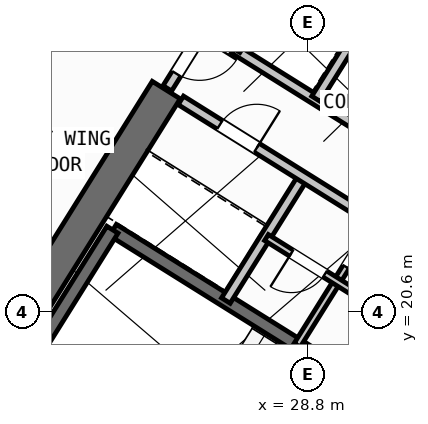
"""IFC4 building model, lengths in metres.
Left out: names, types, materials, properties, quantities, classifications, styles, units other than length and angle.
Written with IfcOpenShell. Run it as: python <this file> out.ifc"""

import sys

from ifc_helpers import new_model, si_unit, direction, frame, frame_2d, origin, place, context, subcontext, project, spatial, rectangle, extrude, source, transform, mapped, element, fill, save


model = new_model("IFC4")
c1 = context("Model", 3, precision=1e-05, world=origin(), true_north=direction((0.0, 1.0)))
c2 = subcontext(c1, "Body", "Model", "MODEL_VIEW")
j1 = project(units=[si_unit("LENGTHUNIT", "METRE"), si_unit("PLANEANGLEUNIT", "RADIAN")], contexts=[c1])
p1 = place(None, origin())
s1 = spatial("IfcSite", under=j1, at=p1, CompositionType="ELEMENT")
p2 = place(p1, origin())
s2 = spatial("IfcBuilding", under=s1, at=p2, CompositionType="ELEMENT")
p3 = place(p2, frame((0.0, 0.0, 45.6)))
s3 = spatial("IfcBuildingStorey", under=s2, at=p3, CompositionType="ELEMENT", Elevation=45.6)
p4 = place(p3, frame((40.615, 23.983, 0.0), z_axis=(0.0, 0.0, 1.0), x_axis=(-0.848045953968, 0.529922692436, 0.0)))
e1 = element("IfcWall", 1, at=p4, inside=s3, PredefinedType="SHEAR", context=c2, shape_type="SweptSolid", body=[
    extrude(rectangle(XDim=13.24, YDim=0.65, at=frame_2d((6.62, 0.0))), origin(), (0.0, 0.0, 1.0), 3.35),
])
p5 = place(p3, frame((26.007, 24.976, 0.0), z_axis=(0.0, 0.0, 1.0), x_axis=(-0.529916319127, -0.848049936456, 0.0)))
e2 = element("IfcWall", 2, at=p5, inside=s3, PredefinedType="SHEAR", context=c2, shape_type="SweptSolid", body=[
    extrude(rectangle(XDim=6.375, YDim=0.65, at=frame_2d((3.188, 0.0))), origin(), (0.0, 0.0, 1.0), 3.35),
])
p6 = place(p3, frame((29.268, 6.429, 0.0), z_axis=(0.0, 0.0, 1.0), x_axis=(-0.848049971435, 0.529916263149, 0.0)))
e3 = element("IfcWall", 3, at=p6, inside=s3, PredefinedType="STANDARD", context=c2, shape_type="SweptSolid", body=[
    extrude(rectangle(XDim=31.588, YDim=0.32, at=frame_2d((15.794, 0.0))), origin(), (0.0, 0.0, 1.0), 3.35),
])
p7 = place(p6, frame((16.362, 0.0, 0.0)))
e4 = element("IfcOpeningElement", 4, at=p7, cuts=e3, PredefinedType="OPENING", context=c2, shape_type="SweptSolid", body=[
    extrude(rectangle(XDim=1.2, YDim=2.15, at=frame_2d((0.6, 1.075))), frame((0.0, 0.17, 0.0), z_axis=(0.0, -1.0, 0.0), x_axis=(1.0, 0.0, 0.0)), (0.0, 0.0, 1.0), 0.34),
])
p8 = place(p6, frame((2.989, 0.0, 0.8)))
e5 = element("IfcOpeningElement", 5, at=p8, cuts=e3, PredefinedType="OPENING", context=c2, shape_type="SweptSolid", body=[
    extrude(rectangle(XDim=2.1, YDim=1.55, at=frame_2d((1.05, 0.775))), frame((0.0, 0.17, 0.0), z_axis=(0.0, -1.0, 0.0), x_axis=(1.0, 0.0, 0.0)), (0.0, 0.0, 1.0), 0.34),
])
p9 = place(p6, frame((8.359, 0.0, 0.8)))
e6 = element("IfcOpeningElement", 6, at=p9, cuts=e3, PredefinedType="OPENING", context=c2, shape_type="SweptSolid", body=[
    extrude(rectangle(XDim=2.1, YDim=1.55, at=frame_2d((1.05, 0.775))), frame((0.0, 0.17, 0.0), z_axis=(0.0, -1.0, 0.0), x_axis=(1.0, 0.0, 0.0)), (0.0, 0.0, 1.0), 0.34),
])
p10 = place(p6, frame((13.284, 0.0, 0.95)))
e7 = element("IfcOpeningElement", 7, at=p10, cuts=e3, PredefinedType="OPENING", context=c2, shape_type="SweptSolid", body=[
    extrude(rectangle(XDim=1.2, YDim=1.4, at=frame_2d((0.6, 0.7))), frame((0.0, 0.17, 0.0), z_axis=(0.0, -1.0, 0.0), x_axis=(1.0, 0.0, 0.0)), (0.0, 0.0, 1.0), 0.34),
])
p11 = place(p6, frame((20.259, 0.0, 0.95)))
e8 = element("IfcOpeningElement", 8, at=p11, cuts=e3, PredefinedType="OPENING", context=c2, shape_type="SweptSolid", body=[
    extrude(rectangle(XDim=1.2, YDim=1.4, at=frame_2d((0.6, 0.7))), frame((0.0, 0.17, 0.0), z_axis=(0.0, -1.0, 0.0), x_axis=(1.0, 0.0, 0.0)), (0.0, 0.0, 1.0), 0.34),
])
p12 = place(p6, frame((22.929, 0.0, 0.95)))
e9 = element("IfcOpeningElement", 9, at=p12, cuts=e3, PredefinedType="OPENING", context=c2, shape_type="SweptSolid", body=[
    extrude(rectangle(XDim=1.2, YDim=1.4, at=frame_2d((0.6, 0.7))), frame((0.0, 0.17, 0.0), z_axis=(0.0, -1.0, 0.0), x_axis=(1.0, 0.0, 0.0)), (0.0, 0.0, 1.0), 0.34),
])
p13 = place(p6, frame((26.106, 0.0, 0.85)))
e10 = element("IfcOpeningElement", 10, at=p13, cuts=e3, PredefinedType="OPENING", context=c2, shape_type="SweptSolid", body=[
    extrude(rectangle(XDim=1.5, YDim=1.5, at=frame_2d((0.75, 0.75))), frame((0.0, 0.17, 0.0), z_axis=(0.0, -1.0, 0.0), x_axis=(1.0, 0.0, 0.0)), (0.0, 0.0, 1.0), 0.34),
])
p14 = place(p6, frame((29.068, 0.0, 0.85)))
e11 = element("IfcOpeningElement", 11, at=p14, cuts=e3, PredefinedType="OPENING", context=c2, shape_type="SweptSolid", body=[
    extrude(rectangle(XDim=1.8, YDim=1.5, at=frame_2d((0.9, 0.75))), frame((0.0, 0.17, 0.0), z_axis=(0.0, -1.0, 0.0), x_axis=(1.0, 0.0, 0.0)), (0.0, 0.0, 1.0), 0.34),
])
p15 = place(p3, frame((14.138, 41.825, 0.0), z_axis=(0.0, 0.0, 1.0), x_axis=(0.848046498049, -0.529921821731, 0.0)))
e12 = element("IfcWall", 12, at=p15, inside=s3, PredefinedType="STANDARD", context=c2, shape_type="SweptSolid", body=[
    extrude(rectangle(XDim=31.588, YDim=0.32, at=frame_2d((15.794, 0.0))), origin(), (0.0, 0.0, 1.0), 3.35),
])
p16 = place(p15, frame((3.159, 0.0, 0.0)))
e13 = element("IfcOpeningElement", 13, at=p16, cuts=e12, PredefinedType="OPENING", context=c2, shape_type="SweptSolid", body=[
    extrude(rectangle(XDim=1.05, YDim=2.15, at=frame_2d((0.525, 1.075))), frame((0.0, 0.17, 0.0), z_axis=(0.0, -1.0, 0.0), x_axis=(1.0, 0.0, 0.0)), (0.0, 0.0, 1.0), 0.34),
])
p17 = place(p15, frame((0.906, 0.0, 1.0)))
e14 = element("IfcOpeningElement", 14, at=p17, cuts=e12, PredefinedType="OPENING", context=c2, shape_type="SweptSolid", body=[
    extrude(rectangle(XDim=0.9, YDim=1.25, at=frame_2d((0.45, 0.625))), frame((0.0, 0.17, 0.0), z_axis=(0.0, -1.0, 0.0), x_axis=(1.0, 0.0, 0.0)), (0.0, 0.0, 1.0), 0.34),
])
p18 = place(p15, frame((9.537, 0.0, 0.85)))
e15 = element("IfcOpeningElement", 15, at=p18, cuts=e12, PredefinedType="OPENING", context=c2, shape_type="SweptSolid", body=[
    extrude(rectangle(XDim=1.8, YDim=1.5, at=frame_2d((0.9, 0.75))), frame((0.0, 0.17, 0.0), z_axis=(0.0, -1.0, 0.0), x_axis=(1.0, 0.0, 0.0)), (0.0, 0.0, 1.0), 0.34),
])
p19 = place(p15, frame((13.899, 0.0, 0.85)))
e16 = element("IfcOpeningElement", 16, at=p19, cuts=e12, PredefinedType="OPENING", context=c2, shape_type="SweptSolid", body=[
    extrude(rectangle(XDim=1.5, YDim=1.5, at=frame_2d((0.75, 0.75))), frame((0.0, 0.17, 0.0), z_axis=(0.0, -1.0, 0.0), x_axis=(1.0, 0.0, 0.0)), (0.0, 0.0, 1.0), 0.34),
])
p20 = place(p15, frame((22.019, 0.0, 0.95)))
e17 = element("IfcOpeningElement", 17, at=p20, cuts=e12, PredefinedType="OPENING", context=c2, shape_type="SweptSolid", body=[
    extrude(rectangle(XDim=1.2, YDim=1.4, at=frame_2d((0.6, 0.7))), frame((0.0, 0.17, 0.0), z_axis=(0.0, -1.0, 0.0), x_axis=(1.0, 0.0, 0.0)), (0.0, 0.0, 1.0), 0.34),
])
p21 = place(p15, frame((27.569, 0.0, 0.95)))
e18 = element("IfcOpeningElement", 18, at=p21, cuts=e12, PredefinedType="OPENING", context=c2, shape_type="SweptSolid", body=[
    extrude(rectangle(XDim=1.2, YDim=1.4, at=frame_2d((0.6, 0.7))), frame((0.0, 0.17, 0.0), z_axis=(0.0, -1.0, 0.0), x_axis=(1.0, 0.0, 0.0)), (0.0, 0.0, 1.0), 0.34),
])
p22 = place(p3, frame((31.28, 18.261, 0.0), z_axis=(0.0, 0.0, 1.0), x_axis=(-0.848051618787, 0.529913626805, 0.0)))
e19 = element("IfcWall", 19, at=p22, inside=s3, PredefinedType="SHEAR", context=c2, shape_type="SweptSolid", body=[
    extrude(rectangle(XDim=7.46, YDim=0.26, at=frame_2d((3.73, 0.0))), origin(), (0.0, 0.0, 1.0), 3.35),
])
p23 = place(p22, frame((0.36, 0.0, 0.0)))
e20 = element("IfcOpeningElement", 20, at=p23, cuts=e19, PredefinedType="OPENING", context=c2, shape_type="SweptSolid", body=[
    extrude(rectangle(XDim=0.86, YDim=2.05, at=frame_2d((0.43, 1.025))), frame((0.0, 0.14, 0.0), z_axis=(0.0, -1.0, 0.0), x_axis=(1.0, 0.0, 0.0)), (0.0, 0.0, 1.0), 0.28),
])
p24 = place(p3, frame((24.945, 22.22, 0.0), z_axis=(0.0, 0.0, 1.0), x_axis=(-0.529908658664, -0.84805472316, 0.0)))
e21 = element("IfcWall", 21, at=p24, inside=s3, PredefinedType="SHEAR", context=c2, shape_type="SweptSolid", body=[
    extrude(rectangle(XDim=3.16, YDim=0.26, at=frame_2d((1.58, 0.0))), origin(), (0.0, 0.0, 1.0), 3.35),
])
p25 = place(p3, frame((31.822, 24.998, 0.0), z_axis=(0.0, 0.0, 1.0), x_axis=(-0.848058348634, 0.529902856485, 0.0)))
e22 = element("IfcWall", 22, at=p25, inside=s3, PredefinedType="STANDARD", context=c2, shape_type="SweptSolid", body=[
    extrude(rectangle(XDim=4.568, YDim=0.2, at=frame_2d((2.284, 0.0))), origin(), (0.0, 0.0, 1.0), 3.34),
])
p26 = place(p3, frame((32.108, 22.814, 0.0), z_axis=(0.0, 0.0, 1.0), x_axis=(-0.848042229521, 0.529928652696, 0.0)))
e23 = element("IfcWall", 23, at=p26, inside=s3, PredefinedType="STANDARD", context=c2, shape_type="SweptSolid", body=[
    extrude(rectangle(XDim=5.62, YDim=0.2, at=frame_2d((2.81, 0.0))), origin(), (0.0, 0.0, 1.0), 3.34),
])
p27 = place(p3, frame((28.25, 27.17, 0.0), z_axis=(0.0, 0.0, 1.0), x_axis=(-0.529905827651, -0.848056492117, 0.0)))
e24 = element("IfcWall", 24, at=p27, inside=s3, PredefinedType="STANDARD", context=c2, shape_type="SweptSolid", body=[
    extrude(rectangle(XDim=1.65, YDim=0.2, at=frame_2d((0.825, 0.0))), origin(), (0.0, 0.0, 1.0), 3.34),
])
p28 = place(p3, frame((29.801, 26.142, 0.0), z_axis=(0.0, 0.0, 1.0), x_axis=(-0.529998940003, -0.847998304005, 0.0)))
e25 = element("IfcWall", 25, at=p28, inside=s3, PredefinedType="STANDARD", context=c2, shape_type="SweptSolid", body=[
    extrude(rectangle(XDim=1.58, YDim=0.2, at=frame_2d((0.79, 0.0))), origin(), (0.0, 0.0, 1.0), 3.34),
])
p29 = place(p3, frame((28.71, 23.263, 0.0), z_axis=(0.0, 0.0, 1.0), x_axis=(-0.529907497854, -0.848055448493, 0.0)))
e26 = element("IfcWall", 26, at=p29, inside=s3, PredefinedType="STANDARD", context=c2, shape_type="SweptSolid", body=[
    extrude(rectangle(XDim=2.88, YDim=0.2, at=frame_2d((1.44, 0.0))), origin(), (0.0, 0.0, 1.0), 3.34),
])
p30 = place(p3, frame((31.525, 21.504, 0.0), z_axis=(0.0, 0.0, 1.0), x_axis=(-0.848044998614, 0.529924221305, 0.0)))
e27 = element("IfcWall", 27, at=p30, inside=s3, PredefinedType="STANDARD", context=c2, shape_type="SweptSolid", body=[
    extrude(rectangle(XDim=6.168, YDim=0.2, at=frame_2d((3.084, 0.0))), origin(), (0.0, 0.0, 1.0), 3.34),
])
p31 = place(p30, frame((4.4, 0.0, 0.0)))
e28 = element("IfcOpeningElement", 28, at=p31, cuts=e27, PredefinedType="OPENING", context=c2, shape_type="SweptSolid", body=[
    extrude(rectangle(XDim=0.86, YDim=2.05, at=frame_2d((0.43, 1.025))), frame((0.0, 0.11, 0.0), z_axis=(0.0, -1.0, 0.0), x_axis=(1.0, 0.0, 0.0)), (0.0, 0.0, 1.0), 0.22),
])
p32 = place(p30, frame((0.35, 0.0, 0.0)))
e29 = element("IfcOpeningElement", 29, at=p32, cuts=e27, PredefinedType="OPENING", context=c2, shape_type="SweptSolid", body=[
    extrude(rectangle(XDim=0.86, YDim=2.05, at=frame_2d((0.43, 1.025))), frame((0.0, 0.11, 0.0), z_axis=(0.0, -1.0, 0.0), x_axis=(1.0, 0.0, 0.0)), (0.0, 0.0, 1.0), 0.22),
])
p33 = place(p3, frame((30.117, 22.384, 0.0), z_axis=(0.0, 0.0, 1.0), x_axis=(-0.529951914384, -0.848027693204, 0.0)))
e30 = element("IfcWall", 30, at=p33, inside=s3, PredefinedType="PLUMBINGWALL", context=c2, shape_type="SweptSolid", body=[
    extrude(rectangle(XDim=1.4, YDim=0.14, at=frame_2d((0.7, 0.0))), origin(), (0.0, 0.0, 1.0), 3.34),
])
p34 = place(p33, frame((0.28, 0.0, 0.0)))
e31 = element("IfcOpeningElement", 31, at=p34, cuts=e30, PredefinedType="OPENING", context=c2, shape_type="SweptSolid", body=[
    extrude(rectangle(XDim=0.78, YDim=2.05, at=frame_2d((0.39, 1.025))), frame((0.0, 0.08, 0.0), z_axis=(0.0, -1.0, 0.0), x_axis=(1.0, 0.0, 0.0)), (0.0, 0.0, 1.0), 0.16),
])
p35 = place(p3, frame((29.375, 21.196, 0.0), z_axis=(0.0, 0.0, 1.0), x_axis=(-0.529865479138, -0.848081702443, 0.0)))
e32 = element("IfcWall", 32, at=p35, inside=s3, PredefinedType="PLUMBINGWALL", context=c2, shape_type="SweptSolid", body=[
    extrude(rectangle(XDim=1.48, YDim=0.14, at=frame_2d((0.74, 0.0))), origin(), (0.0, 0.0, 1.0), 3.34),
])
p36 = place(p3, frame((30.766, 20.327, 0.0), z_axis=(0.0, 0.0, 1.0), x_axis=(-0.848052663127, 0.529911955482, 0.0)))
e33 = element("IfcWall", 33, at=p36, inside=s3, PredefinedType="PLUMBINGWALL", context=c2, shape_type="SweptSolid", body=[
    extrude(rectangle(XDim=3.28, YDim=0.14, at=frame_2d((1.64, 0.0))), origin(), (0.0, 0.0, 1.0), 3.34),
])
p37 = place(p36, frame((0.25, 0.0, 0.0)))
e34 = element("IfcOpeningElement", 34, at=p37, cuts=e33, PredefinedType="OPENING", context=c2, shape_type="SweptSolid", body=[
    extrude(rectangle(XDim=0.78, YDim=2.05, at=frame_2d((0.39, 1.025))), frame((0.0, 0.08, 0.0), z_axis=(0.0, -1.0, 0.0), x_axis=(1.0, 0.0, 0.0)), (0.0, 0.0, 1.0), 0.16),
])
p38 = place(p36, frame((1.92, 0.0, 0.0)))
e35 = element("IfcOpeningElement", 35, at=p38, cuts=e33, PredefinedType="OPENING", context=c2, shape_type="SweptSolid", body=[
    extrude(rectangle(XDim=0.78, YDim=2.05, at=frame_2d((0.39, 1.025))), frame((0.0, 0.08, 0.0), z_axis=(0.0, -1.0, 0.0), x_axis=(1.0, 0.0, 0.0)), (0.0, 0.0, 1.0), 0.16),
])
p39 = place(p3, frame((27.596, 27.52, 0.0), z_axis=(0.0, 0.0, 1.0), x_axis=(-0.529865479138, -0.848081702443, 0.0)))
e36 = element("IfcWall", 36, at=p39, inside=s3, PredefinedType="STANDARD", context=c2, shape_type="SweptSolid", body=[
    extrude(rectangle(XDim=2.96, YDim=0.2, at=frame_2d((1.48, 0.0))), origin(), (0.0, 0.0, 1.0), 3.34),
])
p40 = place(p39, frame((1.76, 0.0, 0.0)))
e37 = element("IfcOpeningElement", 37, at=p40, cuts=e36, PredefinedType="OPENING", context=c2, shape_type="SweptSolid", body=[
    extrude(rectangle(XDim=0.86, YDim=2.05, at=frame_2d((0.43, 1.025))), frame((0.0, 0.11, 0.0), z_axis=(0.0, -1.0, 0.0), x_axis=(1.0, 0.0, 0.0)), (0.0, 0.0, 1.0), 0.22),
])
p41 = place(p3, frame((27.953, 33.016, 0.0), z_axis=(0.0, 0.0, 1.0), x_axis=(-0.529903001606, -0.848058257957, 0.0)))
e38 = element("IfcWall", 38, at=p41, inside=s3, PredefinedType="PARTITIONING", context=c2, shape_type="SweptSolid", body=[
    extrude(rectangle(XDim=9.15, YDim=0.16, at=frame_2d((4.575, 0.0))), origin(), (0.0, 0.0, 1.0), 3.34),
])
m1 = source(origin(), c2, "Body", "SweptSolid", [
    extrude(rectangle(XDim=0.86, YDim=2.05, at=frame_2d((0.43, 1.025))), frame((0.0, 0.025, 0.0), z_axis=(0.0, -1.0, 0.0), x_axis=(1.0, 0.0, 0.0)), (0.0, 0.0, 1.0), 0.05),
])
p42 = place(p31, frame((0.86, 0.0, 0.0), z_axis=(0.0, 0.0, 1.0), x_axis=(-1.0, 0.0, 0.0)))
e39 = element("IfcDoor", 39, at=p42, inside=s3, OperationType="SINGLE_SWING_RIGHT", PredefinedType="DOOR", context=c2, shape_type="MappedRepresentation", body=[
    mapped(m1, transform((0.0, 0.0, 0.0), scale=1.0)),
])
fill(e28, e39)
m2 = source(origin(), c2, "Body", "SweptSolid", [
    extrude(rectangle(XDim=0.78, YDim=2.05, at=frame_2d((0.39, 1.025))), frame((0.0, 0.025, 0.0), z_axis=(0.0, -1.0, 0.0), x_axis=(1.0, 0.0, 0.0)), (0.0, 0.0, 1.0), 0.05),
])
p43 = place(p34, origin())
e40 = element("IfcDoor", 40, at=p43, inside=s3, OperationType="SINGLE_SWING_RIGHT", PredefinedType="DOOR", context=c2, shape_type="MappedRepresentation", body=[
    mapped(m2, transform((0.0, 0.0, 0.0), scale=1.0)),
])
fill(e31, e40)
p44 = place(p38, origin())
e41 = element("IfcDoor", 41, at=p44, inside=s3, OperationType="SINGLE_SWING_RIGHT", PredefinedType="DOOR", context=c2, shape_type="MappedRepresentation", body=[
    mapped(m2, transform((0.0, 0.0, 0.0), scale=1.0)),
])
fill(e35, e41)
p45 = place(p40, origin())
e42 = element("IfcDoor", 42, at=p45, inside=s3, OperationType="SINGLE_SWING_LEFT", PredefinedType="DOOR", context=c2, shape_type="MappedRepresentation", body=[
    mapped(m1, transform((0.0, 0.0, 0.0), scale=1.0)),
])
fill(e37, e42)
save(model, sys.argv[1])
